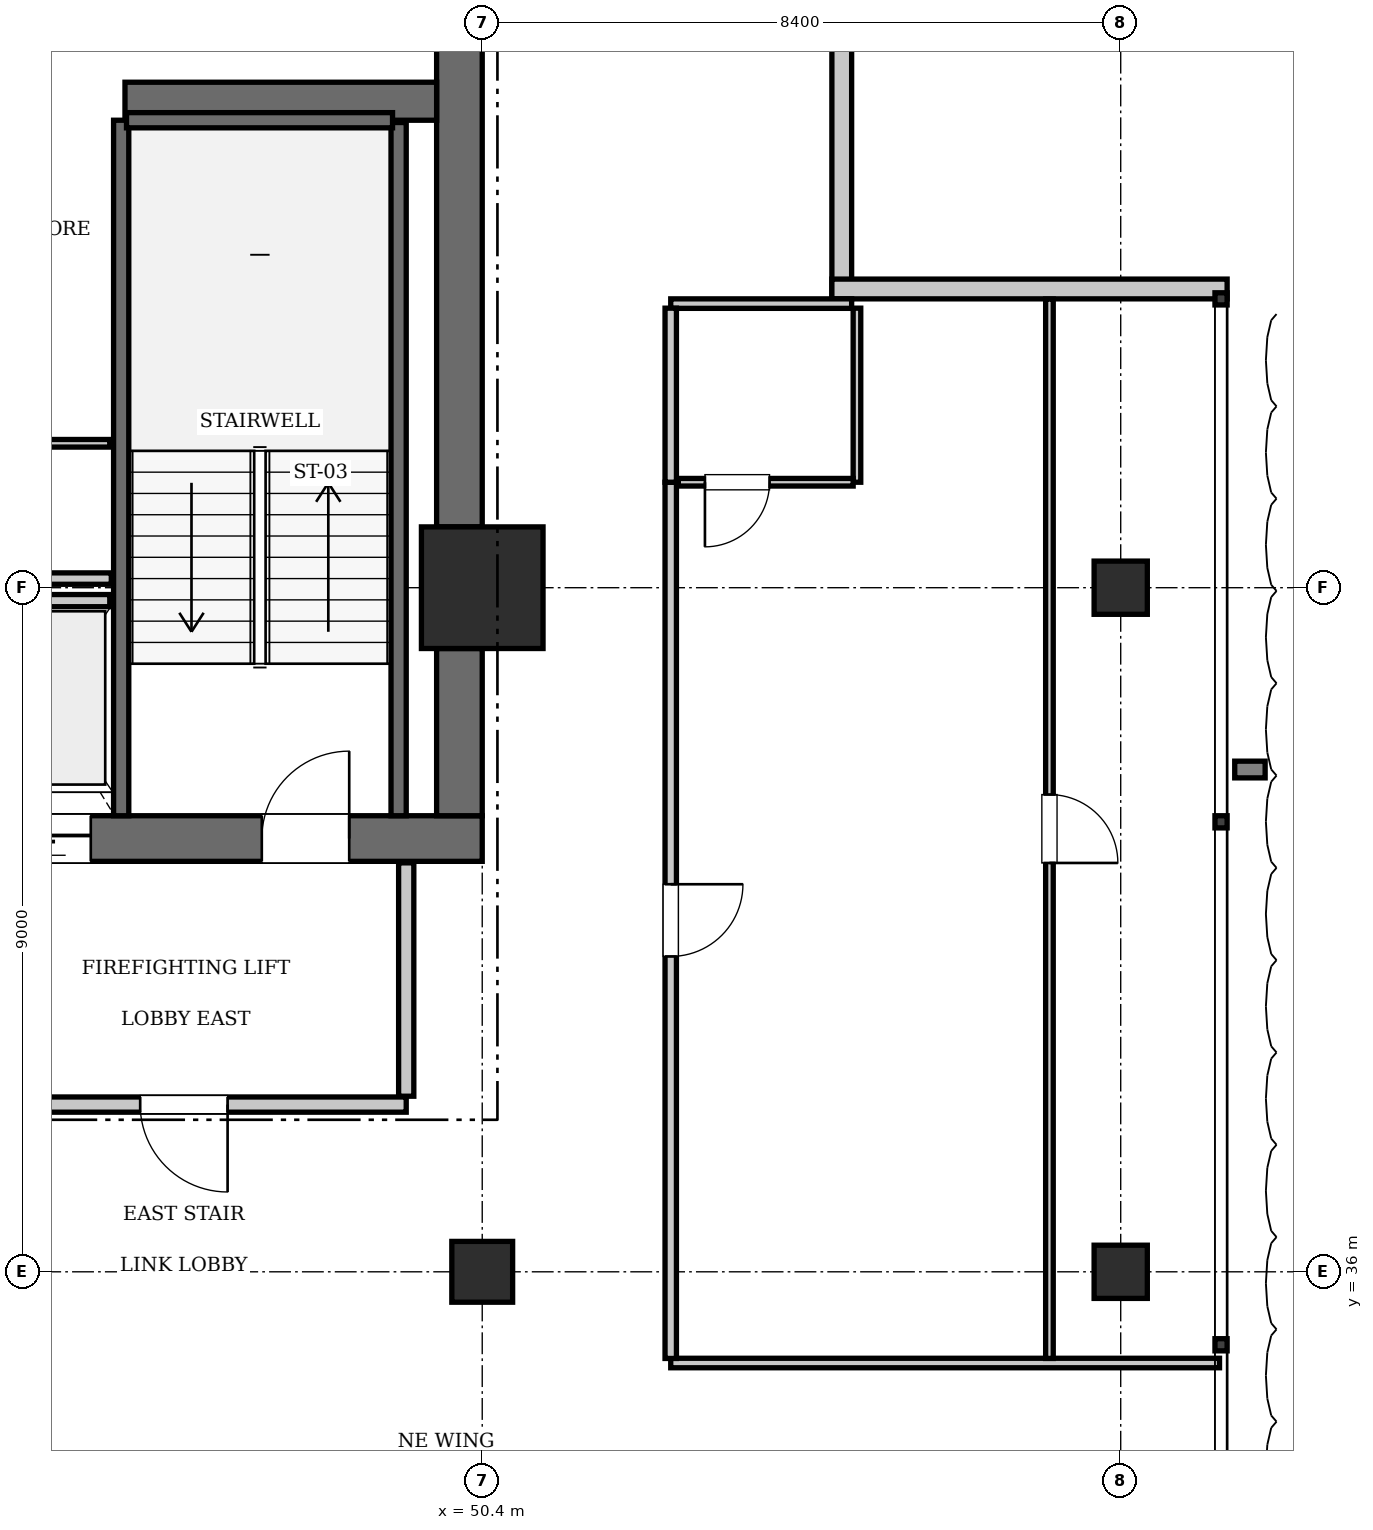
"""IFC4 building model, lengths in metres.
Left out: names, types, materials, properties, quantities, classifications, styles, units other than length and angle.
Written with IfcOpenShell. Run it as: python <this file> out.ifc"""

import sys

from ifc_helpers import new_model, si_unit, direction, frame, frame_2d, origin, origin_2d, place, context, subcontext, project, spatial, rectangle, extrude, element, fill, save


model = new_model("IFC4")
c1 = context("Model", 3, precision=1e-05, world=origin(), true_north=direction((0.0, 1.0)))
c2 = subcontext(c1, "Body", "Model", "MODEL_VIEW")
j1 = project(units=[si_unit("LENGTHUNIT", "METRE"), si_unit("PLANEANGLEUNIT", "RADIAN")], contexts=[c1])
p1 = place(None, origin())
s1 = spatial("IfcSite", under=j1, at=p1, CompositionType="ELEMENT")
p2 = place(p1, origin())
s2 = spatial("IfcBuilding", under=s1, at=p2, CompositionType="ELEMENT")
p3 = place(p2, frame((0.0, 0.0, 274.05)))
s3 = spatial("IfcBuildingStorey", under=s2, at=p3, CompositionType="ELEMENT", Elevation=274.05)
p4 = place(p3, frame((50.4, 45.0, 0.0), z_axis=(0.0, 0.0, 1.0), x_axis=(1.0, 0.0, 0.0)))
e1 = element("IfcColumn", 1, at=p4, inside=s3, PredefinedType="COLUMN", context=c2, shape_type="SweptSolid", body=[
    extrude(rectangle(XDim=1.6, YDim=1.6, at=origin_2d()), origin(), (0.0, 0.0, 1.0), 3.85),
])
p5 = place(p3, frame((43.6, 41.7, 0.0), z_axis=(0.0, 0.0, 1.0), x_axis=(1.0, 0.0, 0.0)))
e2 = element("IfcWall", 2, at=p5, inside=s3, PredefinedType="SHEAR", context=c2, shape_type="SweptSolid", body=[
    extrude(rectangle(XDim=6.8, YDim=0.6, at=frame_2d((3.4, 0.0))), origin(), (0.0, 0.0, 1.0), 3.85),
])
p6 = place(p5, frame((3.9, 0.0, 0.0)))
e3 = element("IfcOpeningElement", 3, at=p6, cuts=e2, PredefinedType="OPENING", context=c2, shape_type="SweptSolid", body=[
    extrude(rectangle(XDim=1.15, YDim=2.15, at=frame_2d((0.575, 1.075))), frame((0.0, 0.31, 0.0), z_axis=(0.0, -1.0, 0.0), x_axis=(1.0, 0.0, 0.0)), (0.0, 0.0, 1.0), 0.62),
])
p7 = place(p5, frame((0.55, 0.0, 0.0)))
e4 = element("IfcOpeningElement", 4, at=p7, cuts=e2, PredefinedType="OPENING", context=c2, shape_type="SweptSolid", body=[
    extrude(rectangle(XDim=1.1, YDim=2.2, at=frame_2d((0.55, 1.1))), frame((0.0, 0.31, 0.0), z_axis=(0.0, -1.0, 0.0), x_axis=(1.0, 0.0, 0.0)), (0.0, 0.0, 1.0), 0.62),
])
p8 = place(p3, frame((50.1, 42.0, 0.0), z_axis=(0.0, 0.0, 1.0), x_axis=(0.0, 1.0, 0.0)))
e5 = element("IfcWall", 5, at=p8, inside=s3, PredefinedType="SHEAR", context=c2, shape_type="SweptSolid", body=[
    extrude(rectangle(XDim=2.2, YDim=0.6, at=frame_2d((1.1, 0.0))), origin(), (0.0, 0.0, 1.0), 3.85),
])
p9 = place(p3, frame((50.1, 45.8, 0.0), z_axis=(0.0, 0.0, 1.0), x_axis=(0.0, 1.0, 0.0)))
e6 = element("IfcWall", 6, at=p9, inside=s3, PredefinedType="SHEAR", context=c2, shape_type="SweptSolid", body=[
    extrude(rectangle(XDim=7.6, YDim=0.6, at=frame_2d((3.8, 0.0))), origin(), (0.0, 0.0, 1.0), 3.85),
])
p10 = place(p3, frame((45.7, 51.4, 0.0), z_axis=(0.0, 0.0, 1.0), x_axis=(1.0, 0.0, 0.0)))
e7 = element("IfcWall", 7, at=p10, inside=s3, PredefinedType="SHEAR", context=c2, shape_type="SweptSolid", body=[
    extrude(rectangle(XDim=4.1, YDim=0.5, at=frame_2d((2.05, 0.0))), origin(), (0.0, 0.0, 1.0), 3.85),
])
p11 = place(p3, frame((50.4, 36.0, 0.0), z_axis=(0.0, 0.0, 1.0), x_axis=(1.0, 0.0, 0.0)))
e8 = element("IfcColumn", 8, at=p11, inside=s3, PredefinedType="COLUMN", context=c2, shape_type="SweptSolid", body=[
    extrude(rectangle(XDim=0.8, YDim=0.8, at=origin_2d()), origin(), (0.0, 0.0, 1.0), 3.85),
])
for number, where, z_axis, x_axis in (
    (9, (58.8, 36.0, 0.0), (0.0, 0.0, 1.0), (1.0, 0.0, 0.0)),
    (10, (58.8, 45.0, 0.0), (0.0, 0.0, 1.0), (1.0, 0.0, 0.0)),
):
    element("IfcColumn", number, at=place(p3, frame(where, z_axis=z_axis, x_axis=x_axis)), inside=s3, PredefinedType="COLUMN", context=c2, shape_type="SweptSolid", body=[
        extrude(rectangle(XDim=0.7, YDim=0.7, at=origin_2d()), origin(), (0.0, 0.0, 1.0), 3.85),
    ])
p12 = place(p3, frame((45.65, 42.0, 0.0), z_axis=(0.0, 0.0, 1.0), x_axis=(0.0, 1.0, 0.0)))
e11 = element("IfcWall", 11, at=p12, inside=s3, PredefinedType="SOLIDWALL", context=c2, shape_type="SweptSolid", body=[
    extrude(rectangle(XDim=9.15, YDim=0.2, at=frame_2d((4.575, 0.0))), origin(), (0.0, 0.0, 1.0), 3.61),
])
p13 = place(p3, frame((49.3, 42.0, 0.0), z_axis=(0.0, 0.0, 1.0), x_axis=(0.0, 1.0, 0.0)))
e12 = element("IfcWall", 12, at=p13, inside=s3, PredefinedType="SOLIDWALL", context=c2, shape_type="SweptSolid", body=[
    extrude(rectangle(XDim=9.12, YDim=0.2, at=frame_2d((4.56, 0.0))), origin(), (0.0, 0.0, 1.0), 3.61),
])
p14 = place(p3, frame((45.72, 51.15, 0.0), z_axis=(0.0, 0.0, 1.0), x_axis=(1.0, 0.0, 0.0)))
e13 = element("IfcWall", 13, at=p14, inside=s3, PredefinedType="SOLIDWALL", context=c2, shape_type="SweptSolid", body=[
    extrude(rectangle(XDim=3.5, YDim=0.2, at=frame_2d((1.75, 0.0))), origin(), (0.0, 0.0, 1.0), 3.61),
])
p15 = place(p3, frame((43.9, 44.83, 0.0), z_axis=(0.0, 0.0, 1.0), x_axis=(1.0, 0.0, 0.0)))
e14 = element("IfcWall", 14, at=p15, inside=s3, PredefinedType="SOLIDWALL", context=c2, shape_type="SweptSolid", body=[
    extrude(rectangle(XDim=1.6, YDim=0.16, at=frame_2d((0.8, 0.0))), origin(), (0.0, 0.0, 1.0), 3.61),
])
for number, where, z_axis, x_axis in (
    (15, (55.13, 54.0, 0.0), (0.0, 0.0, 1.0), (0.0, -1.0, 0.0)),
    (16, (55.0, 48.93, 0.0), (0.0, 0.0, 1.0), (1.0, 0.0, 0.0)),
):
    element("IfcWall", number, at=place(p3, frame(where, z_axis=z_axis, x_axis=x_axis)), inside=s3, PredefinedType="SOLIDWALL", context=c2, shape_type="SweptSolid", body=[
        extrude(rectangle(XDim=5.2, YDim=0.26, at=frame_2d((2.6, 0.0))), origin(), (0.0, 0.0, 1.0), 3.61),
    ])
p16 = place(p3, frame((43.6, 38.2, 0.0), z_axis=(0.0, 0.0, 1.0), x_axis=(1.0, 0.0, 0.0)))
e17 = element("IfcWall", 17, at=p16, inside=s3, PredefinedType="PARTITIONING", context=c2, shape_type="SweptSolid", body=[
    extrude(rectangle(XDim=5.8, YDim=0.2, at=frame_2d((2.9, 0.0))), origin(), (0.0, 0.0, 1.0), 3.61),
])
p17 = place(p16, frame((2.3, 0.0, 0.0)))
e18 = element("IfcOpeningElement", 18, at=p17, cuts=e17, PredefinedType="OPENING", context=c2, shape_type="SweptSolid", body=[
    extrude(rectangle(XDim=1.15, YDim=2.15, at=frame_2d((0.575, 1.075))), frame((0.0, 0.11, 0.0), z_axis=(0.0, -1.0, 0.0), x_axis=(1.0, 0.0, 0.0)), (0.0, 0.0, 1.0), 0.22),
])
p18 = place(p3, frame((49.4, 38.31, 0.0), z_axis=(0.0, 0.0, 1.0), x_axis=(0.0, 1.0, 0.0)))
e19 = element("IfcWall", 19, at=p18, inside=s3, PredefinedType="PARTITIONING", context=c2, shape_type="SweptSolid", body=[
    extrude(rectangle(XDim=3.07, YDim=0.2, at=frame_2d((1.535, 0.0))), origin(), (0.0, 0.0, 1.0), 3.61),
])
p19 = place(p3, frame((42.4, 46.9, 0.0), z_axis=(0.0, 0.0, 1.0), x_axis=(1.0, 0.0, 0.0)))
e20 = element("IfcWall", 20, at=p19, inside=s3, PredefinedType="PARTITIONING", context=c2, shape_type="SweptSolid", body=[
    extrude(rectangle(XDim=3.1, YDim=0.1, at=frame_2d((1.55, 0.0))), origin(), (0.0, 0.0, 1.0), 3.61),
])
p20 = place(p3, frame((42.38, 45.12, 0.0), z_axis=(0.0, 0.0, 1.0), x_axis=(1.0, 0.0, 0.0)))
e21 = element("IfcWall", 21, at=p20, inside=s3, PredefinedType="PARTITIONING", context=c2, shape_type="SweptSolid", body=[
    extrude(rectangle(XDim=3.14, YDim=0.15, at=frame_2d((1.57, 0.0))), origin(), (0.0, 0.0, 1.0), 3.61),
])
p21 = place(p3, frame((52.88, 34.8, 0.0), z_axis=(0.0, 0.0, 1.0), x_axis=(1.0, 0.0, 0.0)))
e22 = element("IfcWall", 22, at=p21, inside=s3, PredefinedType="PARTITIONING", context=c2, shape_type="SweptSolid", body=[
    extrude(rectangle(XDim=7.22, YDim=0.125, at=frame_2d((3.61, 0.0))), origin(), (0.0, 0.0, 1.0), 3.61),
])
p22 = place(p3, frame((52.88, 48.738, 0.0), z_axis=(0.0, 0.0, 1.0), x_axis=(1.0, 0.0, 0.0)))
e23 = element("IfcWall", 23, at=p22, inside=s3, PredefinedType="PARTITIONING", context=c2, shape_type="SweptSolid", body=[
    extrude(rectangle(XDim=2.38, YDim=0.125, at=frame_2d((1.19, 0.0))), origin(), (0.0, 0.0, 1.0), 3.61),
])
p23 = place(p3, frame((52.88, 34.86, 0.0), z_axis=(0.0, 0.0, 1.0), x_axis=(0.0, 1.0, 0.0)))
e24 = element("IfcWall", 24, at=p23, inside=s3, PredefinedType="PARTITIONING", context=c2, shape_type="SweptSolid", body=[
    extrude(rectangle(XDim=11.527, YDim=0.15, at=frame_2d((5.764, 0.0))), origin(), (0.0, 0.0, 1.0), 3.61),
])
p24 = place(p23, frame((5.289, 0.0, 0.0)))
e25 = element("IfcOpeningElement", 25, at=p24, cuts=e24, PredefinedType="OPENING", context=c2, shape_type="SweptSolid", body=[
    extrude(rectangle(XDim=0.95, YDim=2.15, at=frame_2d((0.475, 1.075))), frame((0.0, 0.085, 0.0), z_axis=(0.0, -1.0, 0.0), x_axis=(1.0, 0.0, 0.0)), (0.0, 0.0, 1.0), 0.17),
])
p25 = place(p3, frame((52.88, 46.387, 0.0), z_axis=(0.0, 0.0, 1.0), x_axis=(0.0, 1.0, 0.0)))
e26 = element("IfcWall", 26, at=p25, inside=s3, PredefinedType="PARTITIONING", context=c2, shape_type="SweptSolid", body=[
    extrude(rectangle(XDim=2.29, YDim=0.15, at=frame_2d((1.145, 0.0))), origin(), (0.0, 0.0, 1.0), 3.61),
])
p26 = place(p3, frame((55.33, 46.387, 0.0), z_axis=(0.0, 0.0, 1.0), x_axis=(0.0, 1.0, 0.0)))
e27 = element("IfcWall", 27, at=p26, inside=s3, PredefinedType="PARTITIONING", context=c2, shape_type="SweptSolid", body=[
    extrude(rectangle(XDim=2.29, YDim=0.1, at=frame_2d((1.145, 0.0))), origin(), (0.0, 0.0, 1.0), 3.61),
])
p27 = place(p3, frame((52.98, 46.387, 0.0), z_axis=(0.0, 0.0, 1.0), x_axis=(1.0, 0.0, 0.0)))
e28 = element("IfcWall", 28, at=p27, inside=s3, PredefinedType="PARTITIONING", context=c2, shape_type="SweptSolid", body=[
    extrude(rectangle(XDim=2.3, YDim=0.1, at=frame_2d((1.15, 0.0))), origin(), (0.0, 0.0, 1.0), 3.61),
])
p28 = place(p27, frame((0.35, 0.0, 0.0)))
e29 = element("IfcOpeningElement", 29, at=p28, cuts=e28, PredefinedType="OPENING", context=c2, shape_type="SweptSolid", body=[
    extrude(rectangle(XDim=0.85, YDim=2.1, at=frame_2d((0.425, 1.05))), frame((0.0, 0.06, 0.0), z_axis=(0.0, -1.0, 0.0), x_axis=(1.0, 0.0, 0.0)), (0.0, 0.0, 1.0), 0.12),
])
p29 = place(p3, frame((57.862, 34.86, 0.0), z_axis=(0.0, 0.0, 1.0), x_axis=(0.0, 1.0, 0.0)))
e30 = element("IfcWall", 30, at=p29, inside=s3, PredefinedType="PARTITIONING", context=c2, shape_type="SweptSolid", body=[
    extrude(rectangle(XDim=13.938, YDim=0.1, at=frame_2d((6.969, 0.0))), origin(), (0.0, 0.0, 1.0), 3.61),
])
p30 = place(p29, frame((6.519, 0.0, 0.0)))
e31 = element("IfcOpeningElement", 31, at=p30, cuts=e30, PredefinedType="OPENING", context=c2, shape_type="SweptSolid", body=[
    extrude(rectangle(XDim=0.9, YDim=2.1, at=frame_2d((0.45, 1.05))), frame((0.0, 0.06, 0.0), z_axis=(0.0, -1.0, 0.0), x_axis=(1.0, 0.0, 0.0)), (0.0, 0.0, 1.0), 0.12),
])
p31 = place(p6, origin())
e32 = element("IfcDoor", 32, at=p31, inside=s3, OperationType="SINGLE_SWING_RIGHT", PredefinedType="DOOR", context=c2, shape_type="SweptSolid", body=[
    extrude(rectangle(XDim=1.15, YDim=2.15, at=frame_2d((0.575, 1.075))), frame((0.0, 0.025, 0.0), z_axis=(0.0, -1.0, 0.0), x_axis=(1.0, 0.0, 0.0)), (0.0, 0.0, 1.0), 0.05),
])
fill(e3, e32)
p32 = place(p7, frame((1.1, 0.0, 0.0), z_axis=(0.0, 0.0, 1.0), x_axis=(-1.0, 0.0, 0.0)))
e33 = element("IfcDoor", 33, at=p32, inside=s3, OperationType="SLIDING_TO_LEFT", PredefinedType="DOOR", context=c2, shape_type="SweptSolid", body=[
    extrude(rectangle(XDim=1.1, YDim=2.2, at=frame_2d((0.55, 1.1))), frame((0.0, 0.025, 0.0), z_axis=(0.0, -1.0, 0.0), x_axis=(1.0, 0.0, 0.0)), (0.0, 0.0, 1.0), 0.05),
])
fill(e4, e33)
p33 = place(p17, frame((1.15, 0.0, 0.0), z_axis=(0.0, 0.0, 1.0), x_axis=(-1.0, 0.0, 0.0)))
e34 = element("IfcDoor", 34, at=p33, inside=s3, OperationType="SINGLE_SWING_LEFT", PredefinedType="DOOR", context=c2, shape_type="SweptSolid", body=[
    extrude(rectangle(XDim=1.15, YDim=2.15, at=frame_2d((0.575, 1.075))), frame((0.0, 0.025, 0.0), z_axis=(0.0, -1.0, 0.0), x_axis=(1.0, 0.0, 0.0)), (0.0, 0.0, 1.0), 0.05),
])
fill(e18, e34)
p34 = place(p28, frame((0.85, 0.0, 0.0), z_axis=(0.0, 0.0, 1.0), x_axis=(-1.0, 0.0, 0.0)))
e35 = element("IfcDoor", 35, at=p34, inside=s3, OperationType="SINGLE_SWING_RIGHT", PredefinedType="DOOR", context=c2, shape_type="SweptSolid", body=[
    extrude(rectangle(XDim=0.85, YDim=2.1, at=frame_2d((0.425, 1.05))), frame((0.0, 0.025, 0.0), z_axis=(0.0, -1.0, 0.0), x_axis=(1.0, 0.0, 0.0)), (0.0, 0.0, 1.0), 0.05),
])
fill(e29, e35)
p35 = place(p24, frame((0.95, 0.0, 0.0), z_axis=(0.0, 0.0, 1.0), x_axis=(-1.0, 0.0, 0.0)))
e36 = element("IfcDoor", 36, at=p35, inside=s3, OperationType="SINGLE_SWING_LEFT", PredefinedType="DOOR", context=c2, shape_type="SweptSolid", body=[
    extrude(rectangle(XDim=0.95, YDim=2.15, at=frame_2d((0.475, 1.075))), frame((0.0, 0.025, 0.0), z_axis=(0.0, -1.0, 0.0), x_axis=(1.0, 0.0, 0.0)), (0.0, 0.0, 1.0), 0.05),
])
fill(e25, e36)
p36 = place(p30, frame((0.9, 0.0, 0.0), z_axis=(0.0, 0.0, 1.0), x_axis=(-1.0, 0.0, 0.0)))
e37 = element("IfcDoor", 37, at=p36, inside=s3, OperationType="SINGLE_SWING_RIGHT", PredefinedType="DOOR", context=c2, shape_type="SweptSolid", body=[
    extrude(rectangle(XDim=0.9, YDim=2.1, at=frame_2d((0.45, 1.05))), frame((0.0, 0.025, 0.0), z_axis=(0.0, -1.0, 0.0), x_axis=(1.0, 0.0, 0.0)), (0.0, 0.0, 1.0), 0.05),
])
fill(e31, e37)
save(model, sys.argv[1])
